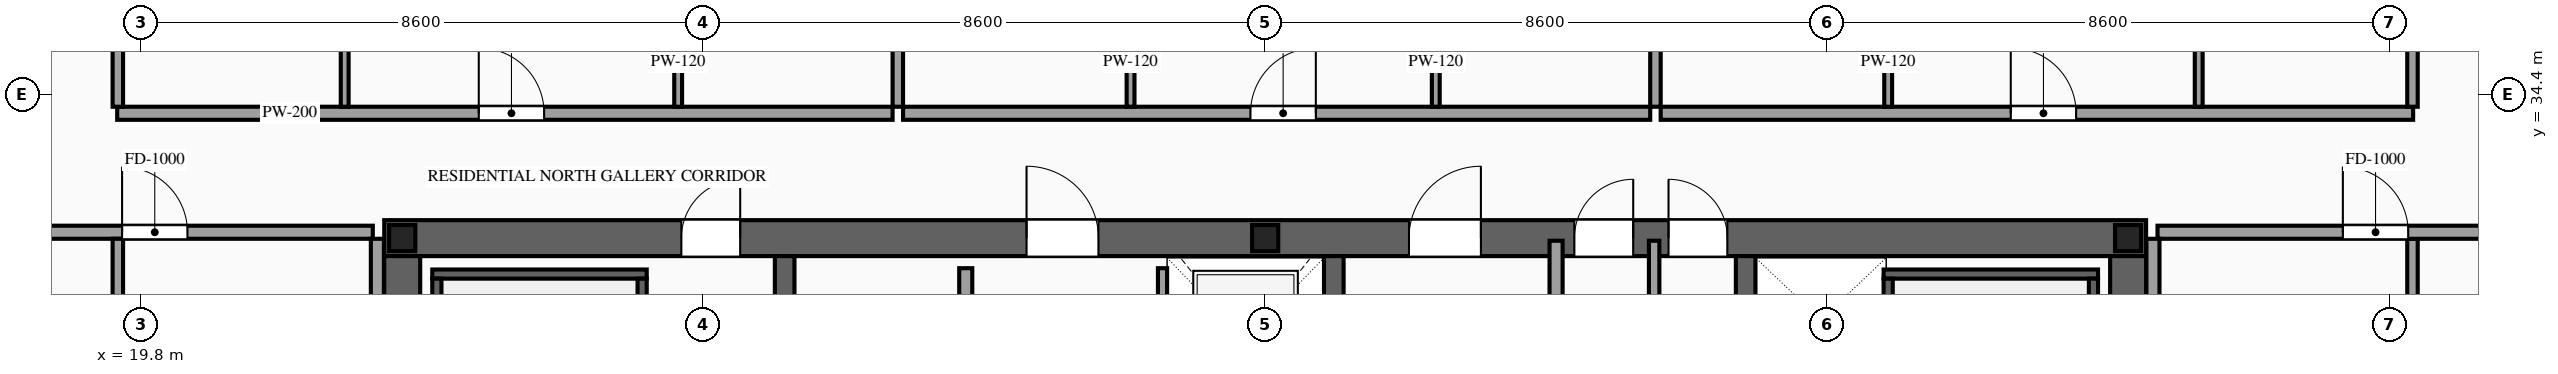
"""IFC4 building model, lengths in metres.
Left out: names, types, materials, properties, quantities, classifications, styles, units other than length and angle.
Written with IfcOpenShell. Run it as: python <this file> out.ifc"""

import sys

from ifc_helpers import new_model, si_unit, direction, frame, frame_2d, origin, origin_2d, place, context, subcontext, project, spatial, rectangle, i_section, extrude, source, transform, mapped, element, fill, save


model = new_model("IFC4")
c1 = context("Model", 3, precision=1e-05, world=origin(), true_north=direction((0.0, 1.0)))
c2 = subcontext(c1, "Body", "Model", "MODEL_VIEW")
j1 = project(units=[si_unit("LENGTHUNIT", "METRE"), si_unit("PLANEANGLEUNIT", "RADIAN")], contexts=[c1])
p1 = place(None, origin())
s1 = spatial("IfcSite", under=j1, at=p1, CompositionType="ELEMENT")
p2 = place(p1, origin())
s2 = spatial("IfcBuilding", under=s1, at=p2, CompositionType="ELEMENT")
p3 = place(p2, frame((0.0, 0.0, 241.6)))
s3 = spatial("IfcBuildingStorey", under=s2, at=p3, CompositionType="ELEMENT", Elevation=241.6)
p4 = place(p3, frame((23.525, 32.2, 0.0), z_axis=(0.0, 0.0, 1.0), x_axis=(1.0, 0.0, 0.0)))
e1 = element("IfcWall", 1, at=p4, inside=s3, PredefinedType="SHEAR", context=c2, shape_type="SweptSolid", body=[
    extrude(rectangle(XDim=26.95, YDim=0.55, at=frame_2d((13.475, 0.0))), origin(), (0.0, 0.0, 1.0), 3.5),
])
p5 = place(p4, frame((4.545, 0.0, 0.0)))
e2 = element("IfcOpeningElement", 2, at=p5, cuts=e1, PredefinedType="OPENING", context=c2, shape_type="SweptSolid", body=[
    extrude(rectangle(XDim=0.9, YDim=2.15, at=frame_2d((0.45, 1.075))), frame((0.0, 0.29, 0.0), z_axis=(0.0, -1.0, 0.0), x_axis=(1.0, 0.0, 0.0)), (0.0, 0.0, 1.0), 0.58),
])
p6 = place(p4, frame((9.825, 0.0, 0.0)))
e3 = element("IfcOpeningElement", 3, at=p6, cuts=e1, PredefinedType="OPENING", context=c2, shape_type="SweptSolid", body=[
    extrude(rectangle(XDim=1.1, YDim=2.2, at=frame_2d((0.55, 1.1))), frame((0.0, 0.29, 0.0), z_axis=(0.0, -1.0, 0.0), x_axis=(1.0, 0.0, 0.0)), (0.0, 0.0, 1.0), 0.58),
])
p7 = place(p4, frame((15.675, 0.0, 0.0)))
e4 = element("IfcOpeningElement", 4, at=p7, cuts=e1, PredefinedType="OPENING", context=c2, shape_type="SweptSolid", body=[
    extrude(rectangle(XDim=1.1, YDim=2.2, at=frame_2d((0.55, 1.1))), frame((0.0, 0.29, 0.0), z_axis=(0.0, -1.0, 0.0), x_axis=(1.0, 0.0, 0.0)), (0.0, 0.0, 1.0), 0.58),
])
p8 = place(p4, frame((18.205, 0.0, 0.0)))
e5 = element("IfcOpeningElement", 5, at=p8, cuts=e1, PredefinedType="OPENING", context=c2, shape_type="SweptSolid", body=[
    extrude(rectangle(XDim=0.9, YDim=2.15, at=frame_2d((0.45, 1.075))), frame((0.0, 0.29, 0.0), z_axis=(0.0, -1.0, 0.0), x_axis=(1.0, 0.0, 0.0)), (0.0, 0.0, 1.0), 0.58),
])
p9 = place(p4, frame((19.645, 0.0, 0.0)))
e6 = element("IfcOpeningElement", 6, at=p9, cuts=e1, PredefinedType="OPENING", context=c2, shape_type="SweptSolid", body=[
    extrude(rectangle(XDim=0.9, YDim=2.15, at=frame_2d((0.45, 1.075))), frame((0.0, 0.29, 0.0), z_axis=(0.0, -1.0, 0.0), x_axis=(1.0, 0.0, 0.0)), (0.0, 0.0, 1.0), 0.58),
])
m1 = source(origin(), c2, "Body", "SweptSolid", [
    extrude(rectangle(XDim=12.25, YDim=0.55, at=frame_2d((6.125, 0.0))), origin(), (0.0, 0.0, 1.0), 3.5),
])
for number, where, z_axis, x_axis in (
    (7, (23.8, 19.675, 0.0), (0.0, 0.0, 1.0), (0.0, 1.0, 0.0)),
    (8, (50.2, 19.675, 0.0), (0.0, 0.0, 1.0), (0.0, 1.0, 0.0)),
):
    element("IfcWall", number, at=place(p3, frame(where, z_axis=z_axis, x_axis=x_axis)), inside=s3, PredefinedType="SHEAR", context=c2, shape_type="MappedRepresentation", body=[
        mapped(m1, transform((0.0, 0.0, 0.0), scale=1.0)),
    ])
m2 = source(origin(), c2, "Body", "SweptSolid", [
    extrude(rectangle(XDim=12.25, YDim=0.3, at=frame_2d((6.125, 0.0))), origin(), (0.0, 0.0, 1.0), 3.5),
])
for number, where, z_axis, x_axis in (
    (9, (29.65, 19.675, 0.0), (0.0, 0.0, 1.0), (0.0, 1.0, 0.0)),
    (10, (38.05, 19.675, 0.0), (0.0, 0.0, 1.0), (0.0, 1.0, 0.0)),
    (11, (44.35, 19.675, 0.0), (0.0, 0.0, 1.0), (0.0, 1.0, 0.0)),
):
    element("IfcWall", number, at=place(p3, frame(where, z_axis=z_axis, x_axis=x_axis)), inside=s3, PredefinedType="SOLIDWALL", context=c2, shape_type="MappedRepresentation", body=[
        mapped(m2, transform((0.0, 0.0, 0.0), scale=1.0)),
    ])
m3 = source(origin(), c2, "Body", "SweptSolid", [
    extrude(i_section(OverallWidth=0.4, OverallDepth=0.4, WebThickness=0.013, FlangeThickness=0.021, at=origin_2d()), origin(), (0.0, 0.0, 1.0), 3.5),
])
for number, where, z_axis, x_axis in (
    (12, (23.8, 32.2, 0.0), (0.0, 0.0, 1.0), (1.0, 0.0, 0.0)),
    (13, (37.0, 32.2, 0.0), (0.0, 0.0, 1.0), (1.0, 0.0, 0.0)),
    (14, (50.2, 32.2, 0.0), (0.0, 0.0, 1.0), (1.0, 0.0, 0.0)),
):
    element("IfcColumn", number, at=place(p3, frame(where, z_axis=z_axis, x_axis=x_axis)), inside=s3, PredefinedType="COLUMN", context=c2, shape_type="MappedRepresentation", body=[
        mapped(m3, transform((0.0, 0.0, 0.0), scale=1.0)),
    ])
p10 = place(p3, frame((35.43, 29.4, 0.0), z_axis=(0.0, 0.0, 1.0), x_axis=(0.0, 1.0, 0.0)))
e15 = element("IfcWall", 15, at=p10, inside=s3, PredefinedType="SOLIDWALL", context=c2, shape_type="SweptSolid", body=[
    extrude(rectangle(XDim=2.34, YDim=0.14, at=frame_2d((1.17, 0.0))), origin(), (0.0, 0.0, 1.0), 3.28),
])
p11 = place(p10, frame((0.62, 0.0, 0.0)))
e16 = element("IfcOpeningElement", 16, at=p11, cuts=e15, PredefinedType="OPENING", context=c2, shape_type="SweptSolid", body=[
    extrude(rectangle(XDim=1.1, YDim=2.2, at=frame_2d((0.55, 1.1))), frame((0.0, 0.085, 0.0), z_axis=(0.0, -1.0, 0.0), x_axis=(1.0, 0.0, 0.0)), (0.0, 0.0, 1.0), 0.17),
])
m4 = source(origin(), c2, "Body", "SweptSolid", [
    extrude(rectangle(XDim=3.28, YDim=0.14, at=frame_2d((1.64, 0.0))), origin(), (0.0, 0.0, 1.0), 3.28),
])
p12 = place(p3, frame((24.26, 31.65, 0.0), z_axis=(0.0, 0.0, 1.0), x_axis=(1.0, 0.0, 0.0)))
e17 = element("IfcWall", 17, at=p12, inside=s3, PredefinedType="SOLIDWALL", context=c2, shape_type="MappedRepresentation", body=[
    mapped(m4, transform((0.0, 0.0, 0.0), scale=1.0)),
])
m5 = source(origin(), c2, "Body", "SweptSolid", [
    extrude(rectangle(XDim=8.94, YDim=0.14, at=frame_2d((4.47, 0.0))), origin(), (0.0, 0.0, 1.0), 3.28),
])
for number, where, z_axis, x_axis in (
    (18, (24.33, 22.64, 0.0), (0.0, 0.0, 1.0), (0.0, 1.0, 0.0)),
    (19, (27.47, 22.64, 0.0), (0.0, 0.0, 1.0), (0.0, 1.0, 0.0)),
):
    element("IfcWall", number, at=place(p3, frame(where, z_axis=z_axis, x_axis=x_axis)), inside=s3, PredefinedType="SOLIDWALL", context=c2, shape_type="MappedRepresentation", body=[
        mapped(m5, transform((0.0, 0.0, 0.0), scale=1.0)),
    ])
p13 = place(p3, frame((46.46, 31.65, 0.0), z_axis=(0.0, 0.0, 1.0), x_axis=(1.0, 0.0, 0.0)))
e20 = element("IfcWall", 20, at=p13, inside=s3, PredefinedType="SOLIDWALL", context=c2, shape_type="MappedRepresentation", body=[
    mapped(m4, transform((0.0, 0.0, 0.0), scale=1.0)),
])
for number, where, z_axis, x_axis in (
    (21, (46.53, 22.64, 0.0), (0.0, 0.0, 1.0), (0.0, 1.0, 0.0)),
    (22, (49.67, 22.64, 0.0), (0.0, 0.0, 1.0), (0.0, 1.0, 0.0)),
):
    element("IfcWall", number, at=place(p3, frame(where, z_axis=z_axis, x_axis=x_axis)), inside=s3, PredefinedType="SOLIDWALL", context=c2, shape_type="MappedRepresentation", body=[
        mapped(m5, transform((0.0, 0.0, 0.0), scale=1.0)),
    ])
p14 = place(p3, frame((32.42, 28.05, 0.0), z_axis=(0.0, 0.0, 1.0), x_axis=(0.0, 1.0, 0.0)))
e23 = element("IfcWall", 23, at=p14, inside=s3, PredefinedType="PARTITIONING", context=c2, shape_type="SweptSolid", body=[
    extrude(rectangle(XDim=3.69, YDim=0.2, at=frame_2d((1.845, 0.0))), origin(), (0.0, 0.0, 1.0), 3.28),
])
p15 = place(p14, frame((1.395, 0.0, 0.0)))
e24 = element("IfcOpeningElement", 24, at=p15, cuts=e23, PredefinedType="OPENING", context=c2, shape_type="SweptSolid", body=[
    extrude(rectangle(XDim=0.9, YDim=2.15, at=frame_2d((0.45, 1.075))), frame((0.0, 0.115, 0.0), z_axis=(0.0, -1.0, 0.0), x_axis=(1.0, 0.0, 0.0)), (0.0, 0.0, 1.0), 0.23),
])
m6 = source(origin(), c2, "Body", "SweptSolid", [
    extrude(rectangle(XDim=5.96, YDim=0.2, at=frame_2d((2.98, 0.0))), origin(), (0.0, 0.0, 1.0), 3.28),
])
p16 = place(p3, frame((41.45, 26.2, 0.0), z_axis=(0.0, 0.0, 1.0), x_axis=(0.0, 1.0, 0.0)))
e25 = element("IfcWall", 25, at=p16, inside=s3, PredefinedType="PARTITIONING", context=c2, shape_type="MappedRepresentation", body=[
    mapped(m6, transform((0.0, 0.0, 0.0), scale=1.0)),
])
m7 = source(origin(), c2, "Body", "SweptSolid", [
    extrude(rectangle(XDim=5.96, YDim=0.16, at=frame_2d((2.98, 0.0))), origin(), (0.0, 0.0, 1.0), 3.28),
])
p17 = place(p3, frame((42.95, 26.2, 0.0), z_axis=(0.0, 0.0, 1.0), x_axis=(0.0, 1.0, 0.0)))
e26 = element("IfcWall", 26, at=p17, inside=s3, PredefinedType="PARTITIONING", context=c2, shape_type="MappedRepresentation", body=[
    mapped(m7, transform((0.0, 0.0, 0.0), scale=1.0)),
])
p18 = place(p3, frame((19.44, 34.11, 0.0), z_axis=(0.0, 0.0, 1.0), x_axis=(1.0, 0.0, 0.0)))
e27 = element("IfcWall", 27, at=p18, inside=s3, PredefinedType="PARTITIONING", context=c2, shape_type="SweptSolid", body=[
    extrude(rectangle(XDim=11.861, YDim=0.2, at=frame_2d((5.931, 0.0))), origin(), (0.0, 0.0, 1.0), 3.28),
])
p19 = place(p18, frame((5.531, 0.0, 0.0)))
e28 = element("IfcOpeningElement", 28, at=p19, cuts=e27, PredefinedType="OPENING", context=c2, shape_type="SweptSolid", body=[
    extrude(rectangle(XDim=1.0, YDim=2.2, at=frame_2d((0.5, 1.1))), frame((0.0, 0.115, 0.0), z_axis=(0.0, -1.0, 0.0), x_axis=(1.0, 0.0, 0.0)), (0.0, 0.0, 1.0), 0.23),
])
m8 = source(origin(), c2, "Body", "SweptSolid", [
    extrude(rectangle(XDim=12.04, YDim=0.16, at=frame_2d((6.02, 0.0))), origin(), (0.0, 0.0, 1.0), 3.28),
])
p20 = place(p3, frame((31.381, 34.21, 0.0), z_axis=(0.0, 0.0, 1.0), x_axis=(0.0, 1.0, 0.0)))
e29 = element("IfcWall", 29, at=p20, inside=s3, PredefinedType="PARTITIONING", context=c2, shape_type="MappedRepresentation", body=[
    mapped(m8, transform((0.0, 0.0, 0.0), scale=1.0)),
])
p21 = place(p3, frame((22.92, 34.21, 0.0), z_axis=(0.0, 0.0, 1.0), x_axis=(0.0, 1.0, 0.0)))
e30 = element("IfcWall", 30, at=p21, inside=s3, PredefinedType="PARTITIONING", context=c2, shape_type="SweptSolid", body=[
    extrude(rectangle(XDim=4.11, YDim=0.12, at=frame_2d((2.055, 0.0))), origin(), (0.0, 0.0, 1.0), 3.28),
])
p22 = place(p21, frame((1.63, 0.0, 0.0)))
e31 = element("IfcOpeningElement", 31, at=p22, cuts=e30, PredefinedType="OPENING", context=c2, shape_type="SweptSolid", body=[
    extrude(rectangle(XDim=0.85, YDim=2.1, at=frame_2d((0.425, 1.05))), frame((0.0, 0.075, 0.0), z_axis=(0.0, -1.0, 0.0), x_axis=(1.0, 0.0, 0.0)), (0.0, 0.0, 1.0), 0.15),
])
p23 = place(p3, frame((28.021, 34.21, 0.0), z_axis=(0.0, 0.0, 1.0), x_axis=(0.0, 1.0, 0.0)))
e32 = element("IfcWall", 32, at=p23, inside=s3, PredefinedType="PARTITIONING", context=c2, shape_type="SweptSolid", body=[
    extrude(rectangle(XDim=4.11, YDim=0.12, at=frame_2d((2.055, 0.0))), origin(), (0.0, 0.0, 1.0), 3.28),
])
p24 = place(p23, frame((1.63, 0.0, 0.0)))
e33 = element("IfcOpeningElement", 33, at=p24, cuts=e32, PredefinedType="OPENING", context=c2, shape_type="SweptSolid", body=[
    extrude(rectangle(XDim=0.85, YDim=2.1, at=frame_2d((0.425, 1.05))), frame((0.0, 0.075, 0.0), z_axis=(0.0, -1.0, 0.0), x_axis=(1.0, 0.0, 0.0)), (0.0, 0.0, 1.0), 0.15),
])
p25 = place(p3, frame((31.461, 34.11, 0.0), z_axis=(0.0, 0.0, 1.0), x_axis=(1.0, 0.0, 0.0)))
e34 = element("IfcWall", 34, at=p25, inside=s3, PredefinedType="PARTITIONING", context=c2, shape_type="SweptSolid", body=[
    extrude(rectangle(XDim=11.429, YDim=0.2, at=frame_2d((5.714, 0.0))), origin(), (0.0, 0.0, 1.0), 3.28),
])
p26 = place(p25, frame((5.314, 0.0, 0.0)))
e35 = element("IfcOpeningElement", 35, at=p26, cuts=e34, PredefinedType="OPENING", context=c2, shape_type="SweptSolid", body=[
    extrude(rectangle(XDim=1.0, YDim=2.2, at=frame_2d((0.5, 1.1))), frame((0.0, 0.115, 0.0), z_axis=(0.0, -1.0, 0.0), x_axis=(1.0, 0.0, 0.0)), (0.0, 0.0, 1.0), 0.23),
])
p27 = place(p3, frame((42.97, 34.21, 0.0), z_axis=(0.0, 0.0, 1.0), x_axis=(0.0, 1.0, 0.0)))
e36 = element("IfcWall", 36, at=p27, inside=s3, PredefinedType="PARTITIONING", context=c2, shape_type="MappedRepresentation", body=[
    mapped(m8, transform((0.0, 0.0, 0.0), scale=1.0)),
])
p28 = place(p3, frame((34.941, 34.21, 0.0), z_axis=(0.0, 0.0, 1.0), x_axis=(0.0, 1.0, 0.0)))
e37 = element("IfcWall", 37, at=p28, inside=s3, PredefinedType="PARTITIONING", context=c2, shape_type="SweptSolid", body=[
    extrude(rectangle(XDim=4.11, YDim=0.12, at=frame_2d((2.055, 0.0))), origin(), (0.0, 0.0, 1.0), 3.28),
])
p29 = place(p28, frame((1.63, 0.0, 0.0)))
e38 = element("IfcOpeningElement", 38, at=p29, cuts=e37, PredefinedType="OPENING", context=c2, shape_type="SweptSolid", body=[
    extrude(rectangle(XDim=0.85, YDim=2.1, at=frame_2d((0.425, 1.05))), frame((0.0, 0.075, 0.0), z_axis=(0.0, -1.0, 0.0), x_axis=(1.0, 0.0, 0.0)), (0.0, 0.0, 1.0), 0.15),
])
p30 = place(p3, frame((39.61, 34.21, 0.0), z_axis=(0.0, 0.0, 1.0), x_axis=(0.0, 1.0, 0.0)))
e39 = element("IfcWall", 39, at=p30, inside=s3, PredefinedType="PARTITIONING", context=c2, shape_type="SweptSolid", body=[
    extrude(rectangle(XDim=4.11, YDim=0.12, at=frame_2d((2.055, 0.0))), origin(), (0.0, 0.0, 1.0), 3.28),
])
p31 = place(p30, frame((1.63, 0.0, 0.0)))
e40 = element("IfcOpeningElement", 40, at=p31, cuts=e39, PredefinedType="OPENING", context=c2, shape_type="SweptSolid", body=[
    extrude(rectangle(XDim=0.85, YDim=2.1, at=frame_2d((0.425, 1.05))), frame((0.0, 0.075, 0.0), z_axis=(0.0, -1.0, 0.0), x_axis=(1.0, 0.0, 0.0)), (0.0, 0.0, 1.0), 0.15),
])
p32 = place(p3, frame((43.05, 34.11, 0.0), z_axis=(0.0, 0.0, 1.0), x_axis=(1.0, 0.0, 0.0)))
e41 = element("IfcWall", 41, at=p32, inside=s3, PredefinedType="PARTITIONING", context=c2, shape_type="SweptSolid", body=[
    extrude(rectangle(XDim=11.51, YDim=0.2, at=frame_2d((5.755, 0.0))), origin(), (0.0, 0.0, 1.0), 3.28),
])
p33 = place(p32, frame((5.355, 0.0, 0.0)))
e42 = element("IfcOpeningElement", 42, at=p33, cuts=e41, PredefinedType="OPENING", context=c2, shape_type="SweptSolid", body=[
    extrude(rectangle(XDim=1.0, YDim=2.2, at=frame_2d((0.5, 1.1))), frame((0.0, 0.115, 0.0), z_axis=(0.0, -1.0, 0.0), x_axis=(1.0, 0.0, 0.0)), (0.0, 0.0, 1.0), 0.23),
])
m9 = source(origin(), c2, "Body", "SweptSolid", [
    extrude(rectangle(XDim=11.89, YDim=0.16, at=frame_2d((5.945, 0.0))), origin(), (0.0, 0.0, 1.0), 3.28),
])
for number, where, z_axis, x_axis in (
    (43, (19.45, 34.21, 0.0), (0.0, 0.0, 1.0), (0.0, 1.0, 0.0)),
    (44, (54.55, 34.21, 0.0), (0.0, 0.0, 1.0), (0.0, 1.0, 0.0)),
):
    element("IfcWall", number, at=place(p3, frame(where, z_axis=z_axis, x_axis=x_axis)), inside=s3, PredefinedType="PARTITIONING", context=c2, shape_type="MappedRepresentation", body=[
        mapped(m9, transform((0.0, 0.0, 0.0), scale=1.0)),
    ])
p34 = place(p3, frame((46.53, 34.21, 0.0), z_axis=(0.0, 0.0, 1.0), x_axis=(0.0, 1.0, 0.0)))
e45 = element("IfcWall", 45, at=p34, inside=s3, PredefinedType="PARTITIONING", context=c2, shape_type="SweptSolid", body=[
    extrude(rectangle(XDim=4.11, YDim=0.12, at=frame_2d((2.055, 0.0))), origin(), (0.0, 0.0, 1.0), 3.28),
])
p35 = place(p34, frame((1.63, 0.0, 0.0)))
e46 = element("IfcOpeningElement", 46, at=p35, cuts=e45, PredefinedType="OPENING", context=c2, shape_type="SweptSolid", body=[
    extrude(rectangle(XDim=0.85, YDim=2.1, at=frame_2d((0.425, 1.05))), frame((0.0, 0.075, 0.0), z_axis=(0.0, -1.0, 0.0), x_axis=(1.0, 0.0, 0.0)), (0.0, 0.0, 1.0), 0.15),
])
p36 = place(p3, frame((51.28, 34.21, 0.0), z_axis=(0.0, 0.0, 1.0), x_axis=(0.0, 1.0, 0.0)))
e47 = element("IfcWall", 47, at=p36, inside=s3, PredefinedType="PARTITIONING", context=c2, shape_type="SweptSolid", body=[
    extrude(rectangle(XDim=4.11, YDim=0.12, at=frame_2d((2.055, 0.0))), origin(), (0.0, 0.0, 1.0), 3.28),
])
p37 = place(p36, frame((1.63, 0.0, 0.0)))
e48 = element("IfcOpeningElement", 48, at=p37, cuts=e47, PredefinedType="OPENING", context=c2, shape_type="SweptSolid", body=[
    extrude(rectangle(XDim=0.85, YDim=2.1, at=frame_2d((0.425, 1.05))), frame((0.0, 0.075, 0.0), z_axis=(0.0, -1.0, 0.0), x_axis=(1.0, 0.0, 0.0)), (0.0, 0.0, 1.0), 0.15),
])
p38 = place(p3, frame((16.55, 32.29, 0.0), z_axis=(0.0, 0.0, 1.0), x_axis=(1.0, 0.0, 0.0)))
e49 = element("IfcWall", 49, at=p38, inside=s3, PredefinedType="PARTITIONING", context=c2, shape_type="SweptSolid", body=[
    extrude(rectangle(XDim=6.8, YDim=0.2, at=frame_2d((3.4, 0.0))), origin(), (0.0, 0.0, 1.0), 2.825),
])
p39 = place(p38, frame((2.965, 0.0, 0.0)))
e50 = element("IfcOpeningElement", 50, at=p39, cuts=e49, PredefinedType="OPENING", context=c2, shape_type="SweptSolid", body=[
    extrude(rectangle(XDim=1.0, YDim=2.2, at=frame_2d((0.5, 1.1))), frame((0.0, 0.115, 0.0), z_axis=(0.0, -1.0, 0.0), x_axis=(1.0, 0.0, 0.0)), (0.0, 0.0, 1.0), 0.23),
])
m10 = source(origin(), c2, "Body", "SweptSolid", [
    extrude(rectangle(XDim=26.69, YDim=0.16, at=frame_2d((13.345, 0.0))), origin(), (0.0, 0.0, 1.0), 3.28),
])
for number, where, z_axis, x_axis in (
    (51, (19.45, 5.5, 0.0), (0.0, 0.0, 1.0), (0.0, 1.0, 0.0)),
    (52, (54.55, 5.5, 0.0), (0.0, 0.0, 1.0), (0.0, 1.0, 0.0)),
):
    element("IfcWall", number, at=place(p3, frame(where, z_axis=z_axis, x_axis=x_axis)), inside=s3, PredefinedType="PARTITIONING", context=c2, shape_type="MappedRepresentation", body=[
        mapped(m10, transform((0.0, 0.0, 0.0), scale=1.0)),
    ])
m11 = source(origin(), c2, "Body", "SweptSolid", [
    extrude(rectangle(XDim=6.29, YDim=0.2, at=frame_2d((3.145, 0.0))), origin(), (0.0, 0.0, 1.0), 3.28),
])
p40 = place(p3, frame((23.42, 25.9, 0.0), z_axis=(0.0, 0.0, 1.0), x_axis=(0.0, 1.0, 0.0)))
e53 = element("IfcWall", 53, at=p40, inside=s3, PredefinedType="PARTITIONING", context=c2, shape_type="MappedRepresentation", body=[
    mapped(m11, transform((0.0, 0.0, 0.0), scale=1.0)),
])
p41 = place(p3, frame((50.65, 32.29, 0.0), z_axis=(0.0, 0.0, 1.0), x_axis=(1.0, 0.0, 0.0)))
e54 = element("IfcWall", 54, at=p41, inside=s3, PredefinedType="PARTITIONING", context=c2, shape_type="SweptSolid", body=[
    extrude(rectangle(XDim=6.8, YDim=0.2, at=frame_2d((3.4, 0.0))), origin(), (0.0, 0.0, 1.0), 2.825),
])
p42 = place(p41, frame((2.835, 0.0, 0.0)))
e55 = element("IfcOpeningElement", 55, at=p42, cuts=e54, PredefinedType="OPENING", context=c2, shape_type="SweptSolid", body=[
    extrude(rectangle(XDim=1.0, YDim=2.2, at=frame_2d((0.5, 1.1))), frame((0.0, 0.115, 0.0), z_axis=(0.0, -1.0, 0.0), x_axis=(1.0, 0.0, 0.0)), (0.0, 0.0, 1.0), 0.23),
])
p43 = place(p3, frame((50.58, 25.9, 0.0), z_axis=(0.0, 0.0, 1.0), x_axis=(0.0, 1.0, 0.0)))
e56 = element("IfcWall", 56, at=p43, inside=s3, PredefinedType="PARTITIONING", context=c2, shape_type="MappedRepresentation", body=[
    mapped(m11, transform((0.0, 0.0, 0.0), scale=1.0)),
])
m12 = source(origin(), c2, "Body", "SweptSolid", [
    extrude(rectangle(XDim=0.9, YDim=2.15, at=frame_2d((0.45, 1.075))), frame((0.0, 0.025, 0.0), z_axis=(0.0, -1.0, 0.0), x_axis=(1.0, 0.0, 0.0)), (0.0, 0.0, 1.0), 0.05),
])
p44 = place(p5, origin())
e57 = element("IfcDoor", 57, at=p44, inside=s3, OperationType="SINGLE_SWING_RIGHT", PredefinedType="DOOR", context=c2, shape_type="MappedRepresentation", body=[
    mapped(m12, transform((0.0, 0.0, 0.0), scale=1.0)),
])
fill(e2, e57)
m13 = source(origin(), c2, "Body", "SweptSolid", [
    extrude(rectangle(XDim=1.1, YDim=2.2, at=frame_2d((0.55, 1.1))), frame((0.0, 0.025, 0.0), z_axis=(0.0, -1.0, 0.0), x_axis=(1.0, 0.0, 0.0)), (0.0, 0.0, 1.0), 0.05),
])
p45 = place(p6, origin())
e58 = element("IfcDoor", 58, at=p45, inside=s3, OperationType="SINGLE_SWING_LEFT", PredefinedType="DOOR", context=c2, shape_type="MappedRepresentation", body=[
    mapped(m13, transform((0.0, 0.0, 0.0), scale=1.0)),
])
fill(e3, e58)
p46 = place(p7, origin())
e59 = element("IfcDoor", 59, at=p46, inside=s3, OperationType="SINGLE_SWING_RIGHT", PredefinedType="DOOR", context=c2, shape_type="MappedRepresentation", body=[
    mapped(m13, transform((0.0, 0.0, 0.0), scale=1.0)),
])
fill(e4, e59)
p47 = place(p8, origin())
e60 = element("IfcDoor", 60, at=p47, inside=s3, OperationType="SINGLE_SWING_RIGHT", PredefinedType="DOOR", context=c2, shape_type="MappedRepresentation", body=[
    mapped(m12, transform((0.0, 0.0, 0.0), scale=1.0)),
])
fill(e5, e60)
p48 = place(p9, origin())
e61 = element("IfcDoor", 61, at=p48, inside=s3, OperationType="SINGLE_SWING_LEFT", PredefinedType="DOOR", context=c2, shape_type="MappedRepresentation", body=[
    mapped(m12, transform((0.0, 0.0, 0.0), scale=1.0)),
])
fill(e6, e61)
m14 = source(origin(), c2, "Body", "SweptSolid", [
    extrude(rectangle(XDim=1.0, YDim=2.2, at=frame_2d((0.5, 1.1))), frame((0.0, 0.025, 0.0), z_axis=(0.0, -1.0, 0.0), x_axis=(1.0, 0.0, 0.0)), (0.0, 0.0, 1.0), 0.05),
])
p49 = place(p19, origin())
e62 = element("IfcDoor", 62, at=p49, inside=s3, OperationType="SINGLE_SWING_LEFT", PredefinedType="DOOR", context=c2, shape_type="MappedRepresentation", body=[
    mapped(m14, transform((0.0, 0.0, 0.0), scale=1.0)),
])
fill(e28, e62)
p50 = place(p26, origin())
e63 = element("IfcDoor", 63, at=p50, inside=s3, OperationType="SINGLE_SWING_RIGHT", PredefinedType="DOOR", context=c2, shape_type="MappedRepresentation", body=[
    mapped(m14, transform((0.0, 0.0, 0.0), scale=1.0)),
])
fill(e35, e63)
p51 = place(p33, origin())
e64 = element("IfcDoor", 64, at=p51, inside=s3, OperationType="SINGLE_SWING_LEFT", PredefinedType="DOOR", context=c2, shape_type="MappedRepresentation", body=[
    mapped(m14, transform((0.0, 0.0, 0.0), scale=1.0)),
])
fill(e42, e64)
p52 = place(p39, origin())
e65 = element("IfcDoor", 65, at=p52, inside=s3, OperationType="SINGLE_SWING_LEFT", PredefinedType="DOOR", context=c2, shape_type="MappedRepresentation", body=[
    mapped(m14, transform((0.0, 0.0, 0.0), scale=1.0)),
])
fill(e50, e65)
p53 = place(p42, origin())
e66 = element("IfcDoor", 66, at=p53, inside=s3, OperationType="SINGLE_SWING_LEFT", PredefinedType="DOOR", context=c2, shape_type="MappedRepresentation", body=[
    mapped(m14, transform((0.0, 0.0, 0.0), scale=1.0)),
])
fill(e55, e66)
save(model, sys.argv[1])
